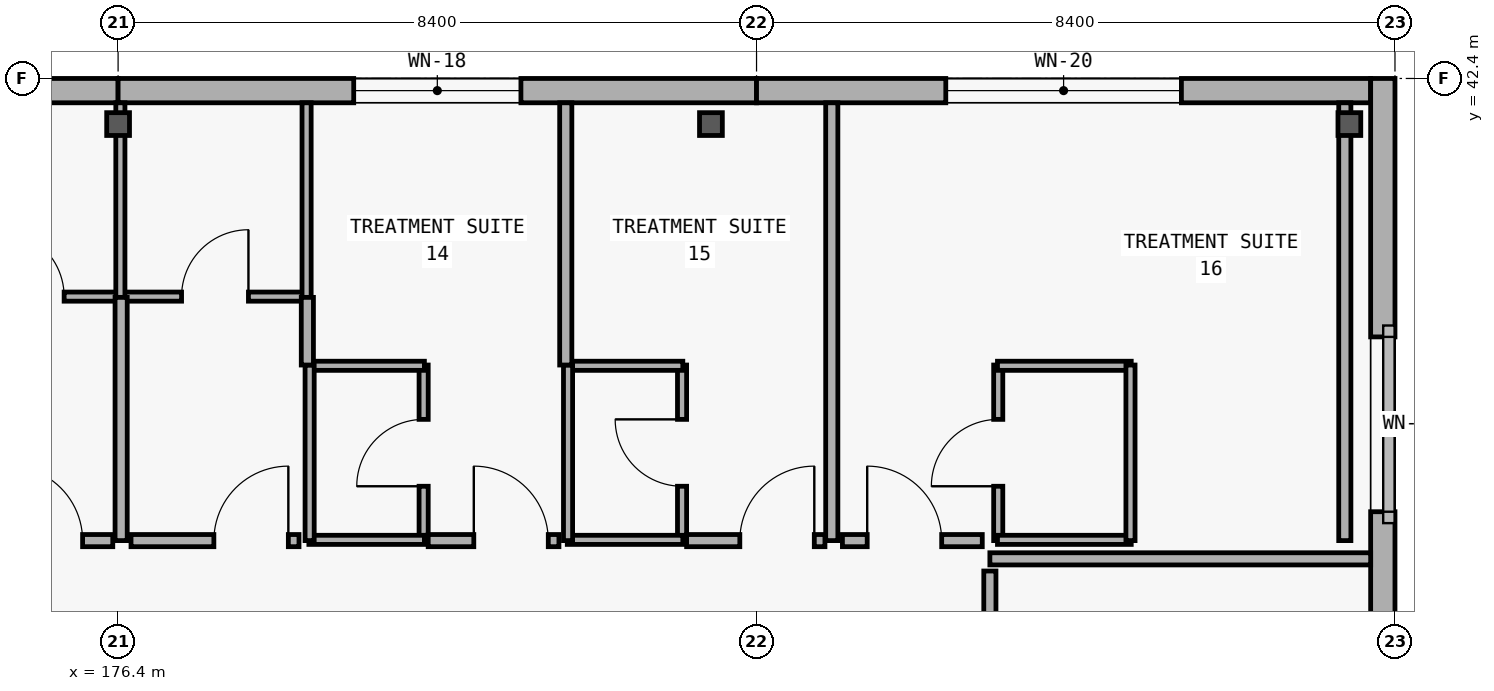
"""IFC4 building model, lengths in metres.
Left out: names, types, materials, properties, quantities, classifications, styles, units other than length and angle.
Written with IfcOpenShell. Run it as: python <this file> out.ifc"""

import sys

from ifc_helpers import new_model, si_unit, direction, frame, frame_2d, origin, origin_2d, place, context, subcontext, project, spatial, rectangle, i_section, extrude, element, fill, save


model = new_model("IFC4")
c1 = context("Model", 3, precision=1e-05, world=origin(), true_north=direction((0.0, 1.0)))
c2 = subcontext(c1, "Body", "Model", "MODEL_VIEW")
j1 = project(units=[si_unit("LENGTHUNIT", "METRE"), si_unit("PLANEANGLEUNIT", "RADIAN")], contexts=[c1])
p1 = place(None, origin())
s1 = spatial("IfcSite", under=j1, at=p1, CompositionType="ELEMENT")
p2 = place(p1, origin())
s2 = spatial("IfcBuilding", under=s1, at=p2, CompositionType="ELEMENT")
p3 = place(p2, frame((0.0, 0.0, 5.4)))
s3 = spatial("IfcBuildingStorey", under=s2, at=p3, CompositionType="ELEMENT", Elevation=5.4)
for number, where, z_axis, x_axis in (
    (1, (176.4, 41.8, 0.0), (0.0, 0.0, 1.0), (1.0, 0.0, 0.0)),
    (2, (184.2, 41.8, 0.0), (0.0, 0.0, 1.0), (1.0, 0.0, 0.0)),
    (3, (192.6, 41.8, 0.0), (0.0, 0.0, 1.0), (1.0, 0.0, 0.0)),
):
    element("IfcColumn", number, at=place(p3, frame(where, z_axis=z_axis, x_axis=x_axis)), inside=s3, PredefinedType="COLUMN", context=c2, shape_type="SweptSolid", body=[
        extrude(i_section(OverallWidth=0.3, OverallDepth=0.3, WebThickness=0.011, FlangeThickness=0.019, at=origin_2d()), origin(), (0.0, 0.0, 1.0), 5.4),
    ])
p4 = place(p3, frame((168.0, 42.24, 0.0), z_axis=(0.0, 0.0, 1.0), x_axis=(1.0, 0.0, 0.0)))
e4 = element("IfcWall", 4, at=p4, inside=s3, PredefinedType="SOLIDWALL", context=c2, shape_type="SweptSolid", body=[
    extrude(rectangle(XDim=8.4, YDim=0.32, at=frame_2d((4.2, 0.0))), origin(), (0.0, 0.0, 1.0), 5.1),
])
p5 = place(p4, frame((3.2, 0.0, 0.9)))
e5 = element("IfcOpeningElement", 5, at=p5, cuts=e4, PredefinedType="OPENING", context=c2, shape_type="SweptSolid", body=[
    extrude(rectangle(XDim=2.0, YDim=1.65, at=frame_2d((1.0, 0.825))), frame((0.0, 0.17, 0.0), z_axis=(0.0, -1.0, 0.0), x_axis=(1.0, 0.0, 0.0)), (0.0, 0.0, 1.0), 0.34),
])
p6 = place(p3, frame((176.4, 42.24, 0.0), z_axis=(0.0, 0.0, 1.0), x_axis=(1.0, 0.0, 0.0)))
e6 = element("IfcWall", 6, at=p6, inside=s3, PredefinedType="SOLIDWALL", context=c2, shape_type="SweptSolid", body=[
    extrude(rectangle(XDim=8.4, YDim=0.32, at=frame_2d((4.2, 0.0))), origin(), (0.0, 0.0, 1.0), 5.1),
])
p7 = place(p6, frame((3.1, 0.0, 0.9)))
e7 = element("IfcOpeningElement", 7, at=p7, cuts=e6, PredefinedType="OPENING", context=c2, shape_type="SweptSolid", body=[
    extrude(rectangle(XDim=2.2, YDim=1.65, at=frame_2d((1.1, 0.825))), frame((0.0, 0.17, 0.0), z_axis=(0.0, -1.0, 0.0), x_axis=(1.0, 0.0, 0.0)), (0.0, 0.0, 1.0), 0.34),
])
p8 = place(p3, frame((184.8, 42.24, 0.0), z_axis=(0.0, 0.0, 1.0), x_axis=(1.0, 0.0, 0.0)))
e8 = element("IfcWall", 8, at=p8, inside=s3, PredefinedType="SOLIDWALL", context=c2, shape_type="SweptSolid", body=[
    extrude(rectangle(XDim=8.08, YDim=0.32, at=frame_2d((4.04, 0.0))), origin(), (0.0, 0.0, 1.0), 5.1),
])
p9 = place(p8, frame((2.49, 0.0, 0.9)))
e9 = element("IfcOpeningElement", 9, at=p9, cuts=e8, PredefinedType="OPENING", context=c2, shape_type="SweptSolid", body=[
    extrude(rectangle(XDim=3.1, YDim=2.2, at=frame_2d((1.55, 1.1))), frame((0.0, 0.17, 0.0), z_axis=(0.0, -1.0, 0.0), x_axis=(1.0, 0.0, 0.0)), (0.0, 0.0, 1.0), 0.34),
])
p10 = place(p3, frame((193.04, 42.4, 0.0), z_axis=(0.0, 0.0, 1.0), x_axis=(0.0, -1.0, 0.0)))
e10 = element("IfcWall", 10, at=p10, inside=s3, PredefinedType="SOLIDWALL", context=c2, shape_type="SweptSolid", body=[
    extrude(rectangle(XDim=9.1, YDim=0.32, at=frame_2d((4.55, 0.0))), origin(), (0.0, 0.0, 1.0), 5.1),
])
p11 = place(p10, frame((3.4, 0.0, 0.9)))
e11 = element("IfcOpeningElement", 11, at=p11, cuts=e10, PredefinedType="OPENING", context=c2, shape_type="SweptSolid", body=[
    extrude(rectangle(XDim=2.3, YDim=2.05, at=frame_2d((1.15, 1.025))), frame((0.0, 0.17, 0.0), z_axis=(0.0, -1.0, 0.0), x_axis=(1.0, 0.0, 0.0)), (0.0, 0.0, 1.0), 0.34),
])
p12 = place(p3, frame((174.06, 39.53, 0.0), z_axis=(0.0, 0.0, 1.0), x_axis=(1.0, 0.0, 0.0)))
e12 = element("IfcWall", 12, at=p12, inside=s3, PredefinedType="PARTITIONING", context=c2, shape_type="SweptSolid", body=[
    extrude(rectangle(XDim=2.38, YDim=0.12, at=frame_2d((1.19, 0.0))), origin(), (0.0, 0.0, 1.0), 4.18),
])
p13 = place(p12, frame((0.75, 0.0, 0.0)))
e13 = element("IfcOpeningElement", 13, at=p13, cuts=e12, PredefinedType="OPENING", context=c2, shape_type="SweptSolid", body=[
    extrude(rectangle(XDim=0.88, YDim=2.15, at=frame_2d((0.44, 1.075))), frame((0.0, 0.07, 0.0), z_axis=(0.0, -1.0, 0.0), x_axis=(1.0, 0.0, 0.0)), (0.0, 0.0, 1.0), 0.14),
])
p14 = place(p3, frame((176.46, 39.53, 0.0), z_axis=(0.0, 0.0, 1.0), x_axis=(1.0, 0.0, 0.0)))
e14 = element("IfcWall", 14, at=p14, inside=s3, PredefinedType="PARTITIONING", context=c2, shape_type="SweptSolid", body=[
    extrude(rectangle(XDim=2.43, YDim=0.12, at=frame_2d((1.215, 0.0))), origin(), (0.0, 0.0, 1.0), 4.18),
])
p15 = place(p14, frame((0.775, 0.0, 0.0)))
e15 = element("IfcOpeningElement", 15, at=p15, cuts=e14, PredefinedType="OPENING", context=c2, shape_type="SweptSolid", body=[
    extrude(rectangle(XDim=0.88, YDim=2.15, at=frame_2d((0.44, 1.075))), frame((0.0, 0.07, 0.0), z_axis=(0.0, -1.0, 0.0), x_axis=(1.0, 0.0, 0.0)), (0.0, 0.0, 1.0), 0.14),
])
p16 = place(p3, frame((180.42, 36.32, 0.0), z_axis=(0.0, 0.0, 1.0), x_axis=(0.0, 1.0, 0.0)))
e16 = element("IfcWall", 16, at=p16, inside=s3, PredefinedType="PARTITIONING", context=c2, shape_type="SweptSolid", body=[
    extrude(rectangle(XDim=2.31, YDim=0.12, at=frame_2d((1.155, 0.0))), origin(), (0.0, 0.0, 1.0), 4.18),
])
p17 = place(p16, frame((0.715, 0.0, 0.0)))
e17 = element("IfcOpeningElement", 17, at=p17, cuts=e16, PredefinedType="OPENING", context=c2, shape_type="SweptSolid", body=[
    extrude(rectangle(XDim=0.88, YDim=2.15, at=frame_2d((0.44, 1.075))), frame((0.0, 0.07, 0.0), z_axis=(0.0, -1.0, 0.0), x_axis=(1.0, 0.0, 0.0)), (0.0, 0.0, 1.0), 0.14),
])
p18 = place(p3, frame((183.82, 36.32, 0.0), z_axis=(0.0, 0.0, 1.0), x_axis=(0.0, 1.0, 0.0)))
e18 = element("IfcWall", 18, at=p18, inside=s3, PredefinedType="PARTITIONING", context=c2, shape_type="SweptSolid", body=[
    extrude(rectangle(XDim=2.31, YDim=0.12, at=frame_2d((1.155, 0.0))), origin(), (0.0, 0.0, 1.0), 4.18),
])
p19 = place(p18, frame((0.715, 0.0, 0.0)))
e19 = element("IfcOpeningElement", 19, at=p19, cuts=e18, PredefinedType="OPENING", context=c2, shape_type="SweptSolid", body=[
    extrude(rectangle(XDim=0.88, YDim=2.15, at=frame_2d((0.44, 1.075))), frame((0.0, 0.07, 0.0), z_axis=(0.0, -1.0, 0.0), x_axis=(1.0, 0.0, 0.0)), (0.0, 0.0, 1.0), 0.14),
])
p20 = place(p3, frame((187.98, 36.32, 0.0), z_axis=(0.0, 0.0, 1.0), x_axis=(0.0, 1.0, 0.0)))
e20 = element("IfcWall", 20, at=p20, inside=s3, PredefinedType="PARTITIONING", context=c2, shape_type="SweptSolid", body=[
    extrude(rectangle(XDim=2.31, YDim=0.12, at=frame_2d((1.155, 0.0))), origin(), (0.0, 0.0, 1.0), 4.18),
])
p21 = place(p20, frame((0.715, 0.0, 0.0)))
e21 = element("IfcOpeningElement", 21, at=p21, cuts=e20, PredefinedType="OPENING", context=c2, shape_type="SweptSolid", body=[
    extrude(rectangle(XDim=0.88, YDim=2.15, at=frame_2d((0.44, 1.075))), frame((0.0, 0.07, 0.0), z_axis=(0.0, -1.0, 0.0), x_axis=(1.0, 0.0, 0.0)), (0.0, 0.0, 1.0), 0.14),
])
p22 = place(p3, frame((187.87, 32.14, 0.0), z_axis=(0.0, 0.0, 1.0), x_axis=(0.0, 1.0, 0.0)))
e22 = element("IfcWall", 22, at=p22, inside=s3, PredefinedType="PARTITIONING", context=c2, shape_type="SweptSolid", body=[
    extrude(rectangle(XDim=3.78, YDim=0.16, at=frame_2d((1.89, 0.0))), origin(), (0.0, 0.0, 1.0), 4.18),
])
p23 = place(p22, frame((2.03, 0.0, 0.0)))
e23 = element("IfcOpeningElement", 23, at=p23, cuts=e22, PredefinedType="OPENING", context=c2, shape_type="SweptSolid", body=[
    extrude(rectangle(XDim=0.98, YDim=2.2, at=frame_2d((0.49, 1.1))), frame((0.0, 0.09, 0.0), z_axis=(0.0, -1.0, 0.0), x_axis=(1.0, 0.0, 0.0)), (0.0, 0.0, 1.0), 0.18),
])
p24 = place(p3, frame((174.17, 36.32, 0.0), z_axis=(0.0, 0.0, 1.0), x_axis=(1.0, 0.0, 0.0)))
e24 = element("IfcWall", 24, at=p24, inside=s3, PredefinedType="PARTITIONING", context=c2, shape_type="SweptSolid", body=[
    extrude(rectangle(XDim=2.16, YDim=0.16, at=frame_2d((1.08, 0.0))), origin(), (0.0, 0.0, 1.0), 4.18),
])
p25 = place(p24, frame((0.783, 0.0, 0.0)))
e25 = element("IfcOpeningElement", 25, at=p25, cuts=e24, PredefinedType="OPENING", context=c2, shape_type="SweptSolid", body=[
    extrude(rectangle(XDim=0.98, YDim=2.2, at=frame_2d((0.49, 1.1))), frame((0.0, 0.09, 0.0), z_axis=(0.0, -1.0, 0.0), x_axis=(1.0, 0.0, 0.0)), (0.0, 0.0, 1.0), 0.18),
])
p26 = place(p3, frame((176.57, 36.32, 0.0), z_axis=(0.0, 0.0, 1.0), x_axis=(1.0, 0.0, 0.0)))
e26 = element("IfcWall", 26, at=p26, inside=s3, PredefinedType="PARTITIONING", context=c2, shape_type="SweptSolid", body=[
    extrude(rectangle(XDim=2.21, YDim=0.16, at=frame_2d((1.105, 0.0))), origin(), (0.0, 0.0, 1.0), 4.18),
])
p27 = place(p26, frame((1.09, 0.0, 0.0)))
e27 = element("IfcOpeningElement", 27, at=p27, cuts=e26, PredefinedType="OPENING", context=c2, shape_type="SweptSolid", body=[
    extrude(rectangle(XDim=0.98, YDim=2.2, at=frame_2d((0.49, 1.1))), frame((0.0, 0.09, 0.0), z_axis=(0.0, -1.0, 0.0), x_axis=(1.0, 0.0, 0.0)), (0.0, 0.0, 1.0), 0.18),
])
p28 = place(p3, frame((180.48, 36.32, 0.0), z_axis=(0.0, 0.0, 1.0), x_axis=(1.0, 0.0, 0.0)))
e28 = element("IfcWall", 28, at=p28, inside=s3, PredefinedType="PARTITIONING", context=c2, shape_type="SweptSolid", body=[
    extrude(rectangle(XDim=1.72, YDim=0.16, at=frame_2d((0.86, 0.0))), origin(), (0.0, 0.0, 1.0), 4.18),
])
p29 = place(p28, frame((0.6, 0.0, 0.0)))
e29 = element("IfcOpeningElement", 29, at=p29, cuts=e28, PredefinedType="OPENING", context=c2, shape_type="SweptSolid", body=[
    extrude(rectangle(XDim=0.98, YDim=2.2, at=frame_2d((0.49, 1.1))), frame((0.0, 0.09, 0.0), z_axis=(0.0, -1.0, 0.0), x_axis=(1.0, 0.0, 0.0)), (0.0, 0.0, 1.0), 0.18),
])
p30 = place(p3, frame((183.88, 36.32, 0.0), z_axis=(0.0, 0.0, 1.0), x_axis=(1.0, 0.0, 0.0)))
e30 = element("IfcWall", 30, at=p30, inside=s3, PredefinedType="PARTITIONING", context=c2, shape_type="SweptSolid", body=[
    extrude(rectangle(XDim=1.82, YDim=0.16, at=frame_2d((0.91, 0.0))), origin(), (0.0, 0.0, 1.0), 4.18),
])
p31 = place(p30, frame((0.7, 0.0, 0.0)))
e31 = element("IfcOpeningElement", 31, at=p31, cuts=e30, PredefinedType="OPENING", context=c2, shape_type="SweptSolid", body=[
    extrude(rectangle(XDim=0.98, YDim=2.2, at=frame_2d((0.49, 1.1))), frame((0.0, 0.09, 0.0), z_axis=(0.0, -1.0, 0.0), x_axis=(1.0, 0.0, 0.0)), (0.0, 0.0, 1.0), 0.18),
])
p32 = place(p3, frame((185.93, 36.32, 0.0), z_axis=(0.0, 0.0, 1.0), x_axis=(1.0, 0.0, 0.0)))
e32 = element("IfcWall", 32, at=p32, inside=s3, PredefinedType="PARTITIONING", context=c2, shape_type="SweptSolid", body=[
    extrude(rectangle(XDim=1.84, YDim=0.16, at=frame_2d((0.92, 0.0))), origin(), (0.0, 0.0, 1.0), 4.18),
])
p33 = place(p32, frame((0.326, 0.0, 0.0)))
e33 = element("IfcOpeningElement", 33, at=p33, cuts=e32, PredefinedType="OPENING", context=c2, shape_type="SweptSolid", body=[
    extrude(rectangle(XDim=0.98, YDim=2.2, at=frame_2d((0.49, 1.1))), frame((0.0, 0.09, 0.0), z_axis=(0.0, -1.0, 0.0), x_axis=(1.0, 0.0, 0.0)), (0.0, 0.0, 1.0), 0.18),
])
for number, where, z_axis, x_axis in (
    (34, (176.43, 39.52, 0.0), (0.0, 0.0, 1.0), (0.0, 1.0, 0.0)),
    (35, (178.88, 39.52, 0.0), (0.0, 0.0, 1.0), (0.0, 1.0, 0.0)),
):
    element("IfcWall", number, at=place(p3, frame(where, z_axis=z_axis, x_axis=x_axis)), inside=s3, PredefinedType="PARTITIONING", context=c2, shape_type="SweptSolid", body=[
        extrude(rectangle(XDim=2.56, YDim=0.12, at=frame_2d((1.28, 0.0))), origin(), (0.0, 0.0, 1.0), 4.18),
    ])
for number, where, z_axis, x_axis in (
    (36, (178.91, 36.33, 0.0), (0.0, 0.0, 1.0), (1.0, 0.0, 0.0)),
    (37, (178.91, 38.62, 0.0), (0.0, 0.0, 1.0), (1.0, 0.0, 0.0)),
):
    element("IfcWall", number, at=place(p3, frame(where, z_axis=z_axis, x_axis=x_axis)), inside=s3, PredefinedType="PARTITIONING", context=c2, shape_type="SweptSolid", body=[
        extrude(rectangle(XDim=1.52, YDim=0.12, at=frame_2d((0.76, 0.0))), origin(), (0.0, 0.0, 1.0), 4.18),
    ])
p34 = place(p3, frame((178.92, 36.32, 0.0), z_axis=(0.0, 0.0, 1.0), x_axis=(0.0, 1.0, 0.0)))
e38 = element("IfcWall", 38, at=p34, inside=s3, PredefinedType="PARTITIONING", context=c2, shape_type="SweptSolid", body=[
    extrude(rectangle(XDim=2.31, YDim=0.12, at=frame_2d((1.155, 0.0))), origin(), (0.0, 0.0, 1.0), 4.18),
])
for number, where, z_axis, x_axis in (
    (39, (182.31, 36.33, 0.0), (0.0, 0.0, 1.0), (1.0, 0.0, 0.0)),
    (40, (182.31, 38.62, 0.0), (0.0, 0.0, 1.0), (1.0, 0.0, 0.0)),
):
    element("IfcWall", number, at=place(p3, frame(where, z_axis=z_axis, x_axis=x_axis)), inside=s3, PredefinedType="PARTITIONING", context=c2, shape_type="SweptSolid", body=[
        extrude(rectangle(XDim=1.52, YDim=0.12, at=frame_2d((0.76, 0.0))), origin(), (0.0, 0.0, 1.0), 4.18),
    ])
p35 = place(p3, frame((182.32, 36.32, 0.0), z_axis=(0.0, 0.0, 1.0), x_axis=(0.0, 1.0, 0.0)))
e41 = element("IfcWall", 41, at=p35, inside=s3, PredefinedType="PARTITIONING", context=c2, shape_type="SweptSolid", body=[
    extrude(rectangle(XDim=2.31, YDim=0.12, at=frame_2d((1.155, 0.0))), origin(), (0.0, 0.0, 1.0), 4.18),
])
for number, where, z_axis, x_axis in (
    (42, (187.97, 36.33, 0.0), (0.0, 0.0, 1.0), (1.0, 0.0, 0.0)),
    (43, (187.97, 38.62, 0.0), (0.0, 0.0, 1.0), (1.0, 0.0, 0.0)),
):
    element("IfcWall", number, at=place(p3, frame(where, z_axis=z_axis, x_axis=x_axis)), inside=s3, PredefinedType="PARTITIONING", context=c2, shape_type="SweptSolid", body=[
        extrude(rectangle(XDim=1.76, YDim=0.12, at=frame_2d((0.88, 0.0))), origin(), (0.0, 0.0, 1.0), 4.18),
    ])
p36 = place(p3, frame((189.72, 36.32, 0.0), z_axis=(0.0, 0.0, 1.0), x_axis=(0.0, 1.0, 0.0)))
e44 = element("IfcWall", 44, at=p36, inside=s3, PredefinedType="PARTITIONING", context=c2, shape_type="SweptSolid", body=[
    extrude(rectangle(XDim=2.31, YDim=0.12, at=frame_2d((1.155, 0.0))), origin(), (0.0, 0.0, 1.0), 4.18),
])
p37 = place(p3, frame((187.87, 36.08, 0.0), z_axis=(0.0, 0.0, 1.0), x_axis=(1.0, 0.0, 0.0)))
e45 = element("IfcWall", 45, at=p37, inside=s3, PredefinedType="PARTITIONING", context=c2, shape_type="SweptSolid", body=[
    extrude(rectangle(XDim=5.01, YDim=0.16, at=frame_2d((2.505, 0.0))), origin(), (0.0, 0.0, 1.0), 4.18),
])
p38 = place(p3, frame((176.44, 36.32, 0.0), z_axis=(0.0, 0.0, 1.0), x_axis=(0.0, 1.0, 0.0)))
e46 = element("IfcWall", 46, at=p38, inside=s3, PredefinedType="PARTITIONING", context=c2, shape_type="SweptSolid", body=[
    extrude(rectangle(XDim=3.2, YDim=0.16, at=frame_2d((1.6, 0.0))), origin(), (0.0, 0.0, 1.0), 4.18),
])
p39 = place(p3, frame((178.89, 38.63, 0.0), z_axis=(0.0, 0.0, 1.0), x_axis=(0.0, 1.0, 0.0)))
e47 = element("IfcWall", 47, at=p39, inside=s3, PredefinedType="PARTITIONING", context=c2, shape_type="SweptSolid", body=[
    extrude(rectangle(XDim=0.89, YDim=0.16, at=frame_2d((0.445, 0.0))), origin(), (0.0, 0.0, 1.0), 4.18),
])
p40 = place(p3, frame((182.29, 38.63, 0.0), z_axis=(0.0, 0.0, 1.0), x_axis=(0.0, 1.0, 0.0)))
e48 = element("IfcWall", 48, at=p40, inside=s3, PredefinedType="PARTITIONING", context=c2, shape_type="SweptSolid", body=[
    extrude(rectangle(XDim=3.45, YDim=0.16, at=frame_2d((1.725, 0.0))), origin(), (0.0, 0.0, 1.0), 4.18),
])
for number, where, z_axis, x_axis in (
    (49, (185.79, 36.32, 0.0), (0.0, 0.0, 1.0), (0.0, 1.0, 0.0)),
    (50, (192.54, 36.32, 0.0), (0.0, 0.0, 1.0), (0.0, 1.0, 0.0)),
):
    element("IfcWall", number, at=place(p3, frame(where, z_axis=z_axis, x_axis=x_axis)), inside=s3, PredefinedType="PARTITIONING", context=c2, shape_type="SweptSolid", body=[
        extrude(rectangle(XDim=5.76, YDim=0.16, at=frame_2d((2.88, 0.0))), origin(), (0.0, 0.0, 1.0), 4.18),
    ])
p41 = place(p7, origin())
e51 = element("IfcWindow", 51, at=p41, inside=s3, PartitioningType="SINGLE_PANEL", PredefinedType="WINDOW", context=c2, shape_type="SweptSolid", body=[
    extrude(rectangle(XDim=2.2, YDim=1.65, at=frame_2d((1.1, 0.825))), frame((0.0, 0.03, 0.0), z_axis=(0.0, -1.0, 0.0), x_axis=(1.0, 0.0, 0.0)), (0.0, 0.0, 1.0), 0.06),
])
fill(e7, e51)
p42 = place(p9, origin())
e52 = element("IfcWindow", 52, at=p42, inside=s3, PartitioningType="SINGLE_PANEL", PredefinedType="WINDOW", context=c2, shape_type="SweptSolid", body=[
    extrude(rectangle(XDim=3.1, YDim=2.2, at=frame_2d((1.55, 1.1))), frame((0.0, 0.03, 0.0), z_axis=(0.0, -1.0, 0.0), x_axis=(1.0, 0.0, 0.0)), (0.0, 0.0, 1.0), 0.06),
])
fill(e9, e52)
p43 = place(p11, origin())
e53 = element("IfcWindow", 53, at=p43, inside=s3, PartitioningType="SINGLE_PANEL", PredefinedType="WINDOW", context=c2, shape_type="SweptSolid", body=[
    extrude(rectangle(XDim=2.3, YDim=2.05, at=frame_2d((1.15, 1.025))), frame((0.0, 0.03, 0.0), z_axis=(0.0, -1.0, 0.0), x_axis=(1.0, 0.0, 0.0)), (0.0, 0.0, 1.0), 0.06),
])
fill(e11, e53)
p44 = place(p13, origin())
e54 = element("IfcDoor", 54, at=p44, inside=s3, OperationType="SINGLE_SWING_LEFT", PredefinedType="DOOR", context=c2, shape_type="SweptSolid", body=[
    extrude(rectangle(XDim=0.88, YDim=2.15, at=frame_2d((0.44, 1.075))), frame((0.0, 0.025, 0.0), z_axis=(0.0, -1.0, 0.0), x_axis=(1.0, 0.0, 0.0)), (0.0, 0.0, 1.0), 0.05),
])
fill(e13, e54)
p45 = place(p15, origin())
e55 = element("IfcDoor", 55, at=p45, inside=s3, OperationType="SINGLE_SWING_RIGHT", PredefinedType="DOOR", context=c2, shape_type="SweptSolid", body=[
    extrude(rectangle(XDim=0.88, YDim=2.15, at=frame_2d((0.44, 1.075))), frame((0.0, 0.025, 0.0), z_axis=(0.0, -1.0, 0.0), x_axis=(1.0, 0.0, 0.0)), (0.0, 0.0, 1.0), 0.05),
])
fill(e15, e55)
p46 = place(p17, origin())
e56 = element("IfcDoor", 56, at=p46, inside=s3, OperationType="SINGLE_SWING_LEFT", PredefinedType="DOOR", context=c2, shape_type="SweptSolid", body=[
    extrude(rectangle(XDim=0.88, YDim=2.15, at=frame_2d((0.44, 1.075))), frame((0.0, 0.025, 0.0), z_axis=(0.0, -1.0, 0.0), x_axis=(1.0, 0.0, 0.0)), (0.0, 0.0, 1.0), 0.05),
])
fill(e17, e56)
p47 = place(p19, origin())
e57 = element("IfcDoor", 57, at=p47, inside=s3, OperationType="SINGLE_SWING_RIGHT", PredefinedType="DOOR", context=c2, shape_type="SweptSolid", body=[
    extrude(rectangle(XDim=0.88, YDim=2.15, at=frame_2d((0.44, 1.075))), frame((0.0, 0.025, 0.0), z_axis=(0.0, -1.0, 0.0), x_axis=(1.0, 0.0, 0.0)), (0.0, 0.0, 1.0), 0.05),
])
fill(e19, e57)
p48 = place(p21, origin())
e58 = element("IfcDoor", 58, at=p48, inside=s3, OperationType="SINGLE_SWING_LEFT", PredefinedType="DOOR", context=c2, shape_type="SweptSolid", body=[
    extrude(rectangle(XDim=0.88, YDim=2.15, at=frame_2d((0.44, 1.075))), frame((0.0, 0.025, 0.0), z_axis=(0.0, -1.0, 0.0), x_axis=(1.0, 0.0, 0.0)), (0.0, 0.0, 1.0), 0.05),
])
fill(e21, e58)
p49 = place(p25, origin())
e59 = element("IfcDoor", 59, at=p49, inside=s3, OperationType="SINGLE_SWING_LEFT", PredefinedType="DOOR", context=c2, shape_type="SweptSolid", body=[
    extrude(rectangle(XDim=0.98, YDim=2.2, at=frame_2d((0.49, 1.1))), frame((0.0, 0.025, 0.0), z_axis=(0.0, -1.0, 0.0), x_axis=(1.0, 0.0, 0.0)), (0.0, 0.0, 1.0), 0.05),
])
fill(e25, e59)
p50 = place(p27, origin())
e60 = element("IfcDoor", 60, at=p50, inside=s3, OperationType="SINGLE_SWING_RIGHT", PredefinedType="DOOR", context=c2, shape_type="SweptSolid", body=[
    extrude(rectangle(XDim=0.98, YDim=2.2, at=frame_2d((0.49, 1.1))), frame((0.0, 0.025, 0.0), z_axis=(0.0, -1.0, 0.0), x_axis=(1.0, 0.0, 0.0)), (0.0, 0.0, 1.0), 0.05),
])
fill(e27, e60)
p51 = place(p29, origin())
e61 = element("IfcDoor", 61, at=p51, inside=s3, OperationType="SINGLE_SWING_LEFT", PredefinedType="DOOR", context=c2, shape_type="SweptSolid", body=[
    extrude(rectangle(XDim=0.98, YDim=2.2, at=frame_2d((0.49, 1.1))), frame((0.0, 0.025, 0.0), z_axis=(0.0, -1.0, 0.0), x_axis=(1.0, 0.0, 0.0)), (0.0, 0.0, 1.0), 0.05),
])
fill(e29, e61)
p52 = place(p31, origin())
e62 = element("IfcDoor", 62, at=p52, inside=s3, OperationType="SINGLE_SWING_RIGHT", PredefinedType="DOOR", context=c2, shape_type="SweptSolid", body=[
    extrude(rectangle(XDim=0.98, YDim=2.2, at=frame_2d((0.49, 1.1))), frame((0.0, 0.025, 0.0), z_axis=(0.0, -1.0, 0.0), x_axis=(1.0, 0.0, 0.0)), (0.0, 0.0, 1.0), 0.05),
])
fill(e31, e62)
p53 = place(p33, origin())
e63 = element("IfcDoor", 63, at=p53, inside=s3, OperationType="SINGLE_SWING_LEFT", PredefinedType="DOOR", context=c2, shape_type="SweptSolid", body=[
    extrude(rectangle(XDim=0.98, YDim=2.2, at=frame_2d((0.49, 1.1))), frame((0.0, 0.025, 0.0), z_axis=(0.0, -1.0, 0.0), x_axis=(1.0, 0.0, 0.0)), (0.0, 0.0, 1.0), 0.05),
])
fill(e33, e63)
save(model, sys.argv[1])
